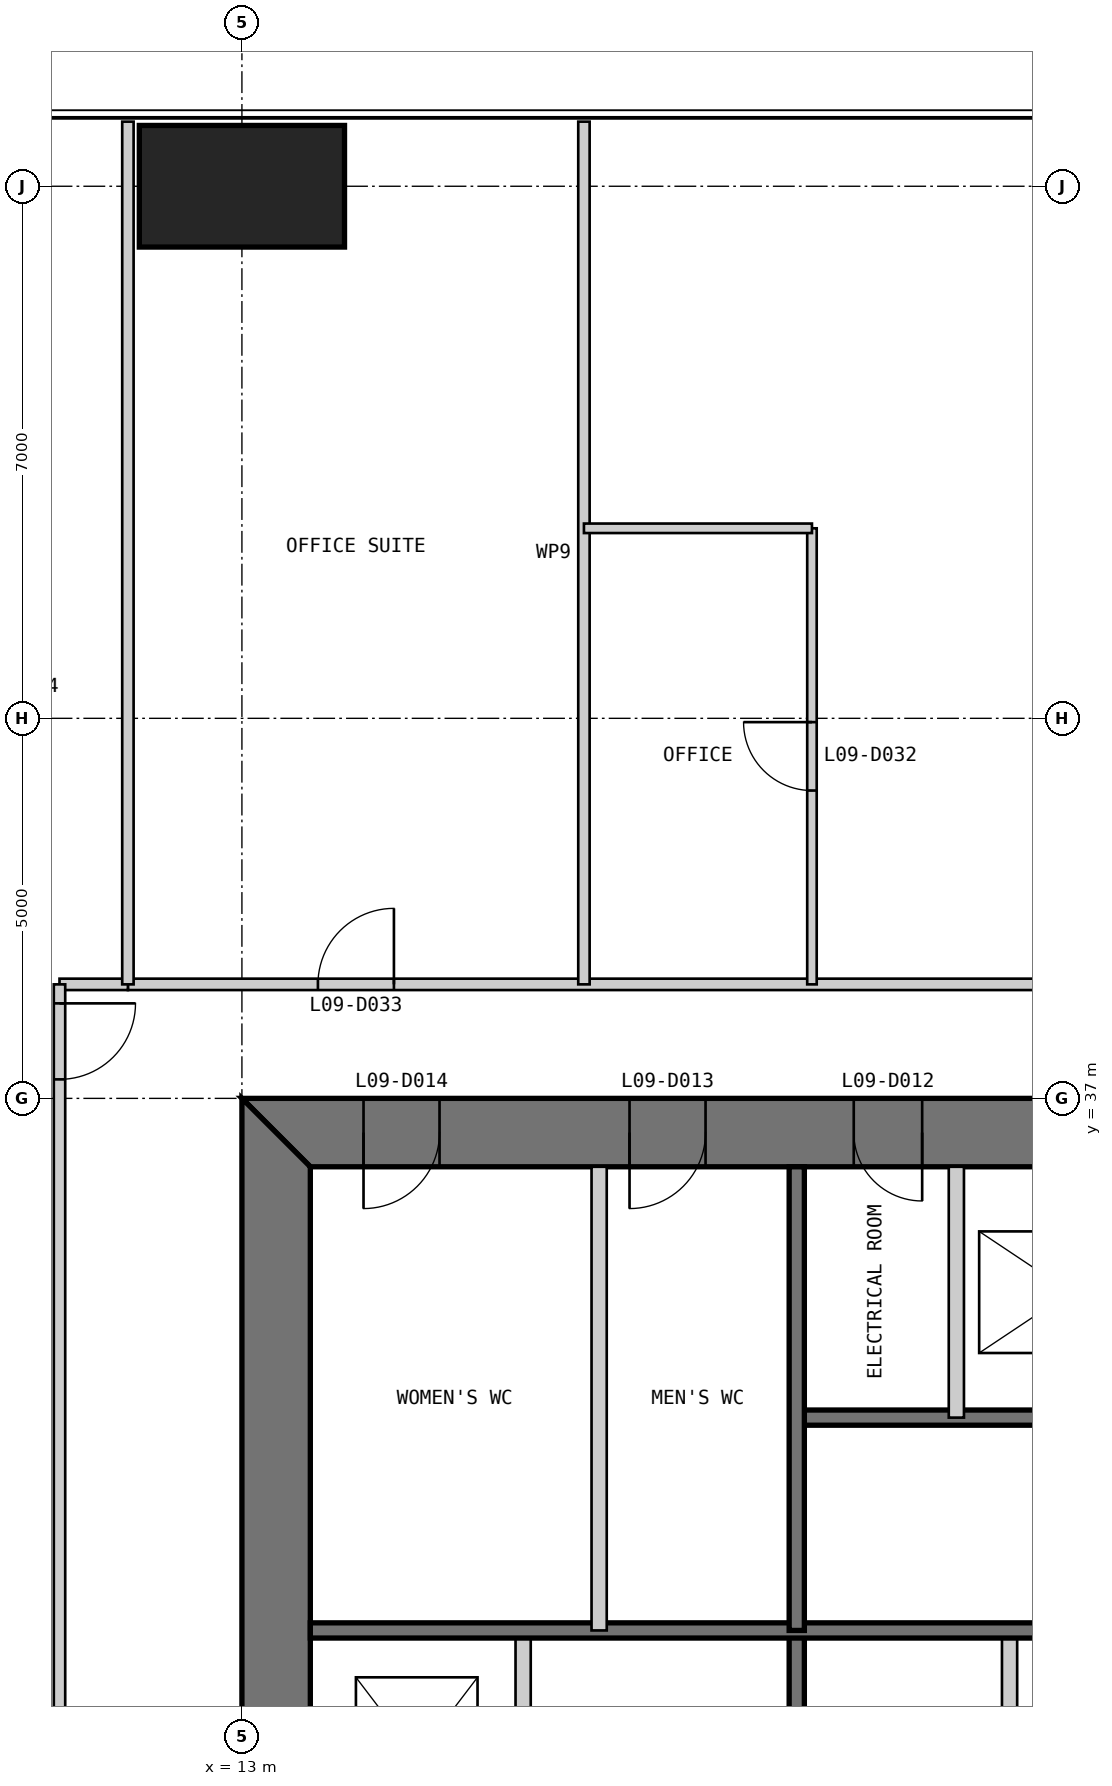
"""IFC4 building model, lengths in metres.
Left out: names, types, materials, properties, quantities, classifications, styles, units other than length and angle.
Written with IfcOpenShell. Run it as: python <this file> out.ifc"""

import sys

from ifc_helpers import new_model, si_unit, direction, frame, frame_2d, origin, origin_2d, place, context, subcontext, project, spatial, polyline, rectangle, outline, extrude, element, fill, save


model = new_model("IFC4")
c1 = context("Model", 3, precision=1e-05, world=origin(), true_north=direction((0.0, 1.0)))
c2 = subcontext(c1, "Body", "Model", "MODEL_VIEW")
j1 = project(units=[si_unit("LENGTHUNIT", "METRE"), si_unit("PLANEANGLEUNIT", "RADIAN")], contexts=[c1])
p1 = place(None, origin())
s1 = spatial("IfcSite", under=j1, at=p1, CompositionType="ELEMENT")
p2 = place(p1, origin())
s2 = spatial("IfcBuilding", under=s1, at=p2, CompositionType="ELEMENT")
p3 = place(p2, frame((0.0, 0.0, 43.0)))
s3 = spatial("IfcBuildingStorey", under=s2, at=p3, CompositionType="ELEMENT", Elevation=43.0)
p4 = place(p3, frame((13.0, 49.0, 0.0), z_axis=(0.0, 0.0, 1.0), x_axis=(1.0, 0.0, 0.0)))
e1 = element("IfcColumn", 1, at=p4, inside=s3, PredefinedType="COLUMN", context=c2, shape_type="SweptSolid", body=[
    extrude(rectangle(XDim=2.7, YDim=1.6, at=origin_2d()), origin(), (0.0, 0.0, 1.0), 4.0),
])
p5 = place(p3, frame((37.0, 36.55, 0.0), z_axis=(0.0, 0.0, 1.0), x_axis=(-1.0, 0.0, 0.0)))
e2 = element("IfcWall", 2, at=p5, inside=s3, PredefinedType="SHEAR", context=c2, shape_type="SweptSolid", body=[
    extrude(outline(polyline([(0.0, -0.45), (24.0, -0.45), (23.1, 0.45), (0.9, 0.45), (0.0, -0.45)])), origin(), (0.0, 0.0, 1.0), 4.0),
])
p6 = place(p5, frame((4.9, 0.0, 0.0)))
e3 = element("IfcOpeningElement", 3, at=p6, cuts=e2, PredefinedType="OPENING", context=c2, shape_type="SweptSolid", body=[
    extrude(rectangle(XDim=1.0, YDim=2.2, at=frame_2d((0.5, 1.1))), frame((0.0, 0.46, 0.0), z_axis=(0.0, -1.0, 0.0), x_axis=(1.0, 0.0, 0.0)), (0.0, 0.0, 1.0), 0.92),
])
p7 = place(p5, frame((8.9, 0.0, 0.0)))
e4 = element("IfcOpeningElement", 4, at=p7, cuts=e2, PredefinedType="OPENING", context=c2, shape_type="SweptSolid", body=[
    extrude(rectangle(XDim=1.1, YDim=2.2, at=frame_2d((0.55, 1.1))), frame((0.0, 0.46, 0.0), z_axis=(0.0, -1.0, 0.0), x_axis=(1.0, 0.0, 0.0)), (0.0, 0.0, 1.0), 0.92),
])
p8 = place(p5, frame((15.05, 0.0, 0.0)))
e5 = element("IfcOpeningElement", 5, at=p8, cuts=e2, PredefinedType="OPENING", context=c2, shape_type="SweptSolid", body=[
    extrude(rectangle(XDim=0.9, YDim=2.2, at=frame_2d((0.45, 1.1))), frame((0.0, 0.46, 0.0), z_axis=(0.0, -1.0, 0.0), x_axis=(1.0, 0.0, 0.0)), (0.0, 0.0, 1.0), 0.92),
])
p9 = place(p5, frame((17.9, 0.0, 0.0)))
e6 = element("IfcOpeningElement", 6, at=p9, cuts=e2, PredefinedType="OPENING", context=c2, shape_type="SweptSolid", body=[
    extrude(rectangle(XDim=1.0, YDim=2.2, at=frame_2d((0.5, 1.1))), frame((0.0, 0.46, 0.0), z_axis=(0.0, -1.0, 0.0), x_axis=(1.0, 0.0, 0.0)), (0.0, 0.0, 1.0), 0.92),
])
p10 = place(p5, frame((21.4, 0.0, 0.0)))
e7 = element("IfcOpeningElement", 7, at=p10, cuts=e2, PredefinedType="OPENING", context=c2, shape_type="SweptSolid", body=[
    extrude(rectangle(XDim=1.0, YDim=2.2, at=frame_2d((0.5, 1.1))), frame((0.0, 0.46, 0.0), z_axis=(0.0, -1.0, 0.0), x_axis=(1.0, 0.0, 0.0)), (0.0, 0.0, 1.0), 0.92),
])
p11 = place(p3, frame((13.45, 36.1, 0.0), z_axis=(0.0, 0.0, 1.0), x_axis=(0.0, -1.0, 0.0)))
e8 = element("IfcWall", 8, at=p11, inside=s3, PredefinedType="SHEAR", context=c2, shape_type="SweptSolid", body=[
    extrude(outline(polyline([(-0.9, -0.45), (23.1, -0.45), (22.2, 0.45), (0.0, 0.45), (-0.9, -0.45)])), origin(), (0.0, 0.0, 1.0), 4.0),
])
p12 = place(p11, frame((20.2, 0.0, 0.0)))
e9 = element("IfcOpeningElement", 9, at=p12, cuts=e8, PredefinedType="OPENING", context=c2, shape_type="SweptSolid", body=[
    extrude(rectangle(XDim=1.0, YDim=2.2, at=frame_2d((0.5, 1.1))), frame((0.0, 0.46, 0.0), z_axis=(0.0, -1.0, 0.0), x_axis=(1.0, 0.0, 0.0)), (0.0, 0.0, 1.0), 0.92),
])
p13 = place(p11, frame((17.25, 0.0, 0.0)))
e10 = element("IfcOpeningElement", 10, at=p13, cuts=e8, PredefinedType="OPENING", context=c2, shape_type="SweptSolid", body=[
    extrude(rectangle(XDim=0.9, YDim=2.2, at=frame_2d((0.45, 1.1))), frame((0.0, 0.46, 0.0), z_axis=(0.0, -1.0, 0.0), x_axis=(1.0, 0.0, 0.0)), (0.0, 0.0, 1.0), 0.92),
])
p14 = place(p3, frame((16.7, 13.9, 0.0), z_axis=(0.0, 0.0, 1.0), x_axis=(0.0, 1.0, 0.0)))
e11 = element("IfcWall", 11, at=p14, inside=s3, PredefinedType="PARTITIONING", context=c2, shape_type="SweptSolid", body=[
    extrude(rectangle(XDim=16.1, YDim=0.2, at=frame_2d((8.05, 0.0))), origin(), (0.0, 0.0, 1.0), 3.8),
])
p15 = place(p14, frame((7.217, 0.0, 0.0)))
e12 = element("IfcOpeningElement", 12, at=p15, cuts=e11, PredefinedType="OPENING", context=c2, shape_type="SweptSolid", body=[
    extrude(rectangle(XDim=1.1, YDim=2.2, at=frame_2d((0.55, 1.1))), frame((0.0, 0.11, 0.0), z_axis=(0.0, -1.0, 0.0), x_axis=(1.0, 0.0, 0.0)), (0.0, 0.0, 1.0), 0.22),
])
p16 = place(p14, frame((10.55, 0.0, 0.0)))
e13 = element("IfcOpeningElement", 13, at=p16, cuts=e11, PredefinedType="OPENING", context=c2, shape_type="SweptSolid", body=[
    extrude(rectangle(XDim=1.1, YDim=2.2, at=frame_2d((0.55, 1.1))), frame((0.0, 0.11, 0.0), z_axis=(0.0, -1.0, 0.0), x_axis=(1.0, 0.0, 0.0)), (0.0, 0.0, 1.0), 0.22),
])
p17 = place(p14, frame((13.883, 0.0, 0.0)))
e14 = element("IfcOpeningElement", 14, at=p17, cuts=e11, PredefinedType="OPENING", context=c2, shape_type="SweptSolid", body=[
    extrude(rectangle(XDim=1.1, YDim=2.2, at=frame_2d((0.55, 1.1))), frame((0.0, 0.11, 0.0), z_axis=(0.0, -1.0, 0.0), x_axis=(1.0, 0.0, 0.0)), (0.0, 0.0, 1.0), 0.22),
])
p18 = place(p3, frame((20.3, 13.9, 0.0), z_axis=(0.0, 0.0, 1.0), x_axis=(0.0, 1.0, 0.0)))
e15 = element("IfcWall", 15, at=p18, inside=s3, PredefinedType="SOLIDWALL", context=c2, shape_type="SweptSolid", body=[
    extrude(rectangle(XDim=16.1, YDim=0.2, at=frame_2d((8.05, 0.0))), origin(), (0.0, 0.0, 1.0), 3.8),
])
p19 = place(p3, frame((23.1, 20.0, 0.0), z_axis=(0.0, 0.0, 1.0), x_axis=(0.0, 1.0, 0.0)))
e16 = element("IfcWall", 16, at=p19, inside=s3, PredefinedType="PARTITIONING", context=c2, shape_type="SweptSolid", body=[
    extrude(rectangle(XDim=10.0, YDim=0.2, at=frame_2d((5.0, 0.0))), origin(), (0.0, 0.0, 1.0), 3.8),
])
p20 = place(p3, frame((29.7, 32.8, 0.0), z_axis=(0.0, 0.0, 1.0), x_axis=(-1.0, 0.0, 0.0)))
e17 = element("IfcWall", 17, at=p20, inside=s3, PredefinedType="SOLIDWALL", context=c2, shape_type="SweptSolid", body=[
    extrude(rectangle(XDim=9.4, YDim=0.2, at=frame_2d((4.7, 0.0))), origin(), (0.0, 0.0, 1.0), 3.8),
])
p21 = place(p20, frame((0.25, 0.0, 0.0)))
e18 = element("IfcOpeningElement", 18, at=p21, cuts=e17, PredefinedType="OPENING", context=c2, shape_type="SweptSolid", body=[
    extrude(rectangle(XDim=1.0, YDim=2.2, at=frame_2d((0.5, 1.1))), frame((0.0, 0.11, 0.0), z_axis=(0.0, -1.0, 0.0), x_axis=(1.0, 0.0, 0.0)), (0.0, 0.0, 1.0), 0.22),
])
p22 = place(p3, frame((29.7, 30.0, 0.0), z_axis=(0.0, 0.0, 1.0), x_axis=(-1.0, 0.0, 0.0)))
e19 = element("IfcWall", 19, at=p22, inside=s3, PredefinedType="SOLIDWALL", context=c2, shape_type="SweptSolid", body=[
    extrude(rectangle(XDim=15.8, YDim=0.2, at=frame_2d((7.9, 0.0))), origin(), (0.0, 0.0, 1.0), 3.8),
])
p23 = place(p3, frame((22.4, 36.1, 0.0), z_axis=(0.0, 0.0, 1.0), x_axis=(0.0, -1.0, 0.0)))
e20 = element("IfcWall", 20, at=p23, inside=s3, PredefinedType="PARTITIONING", context=c2, shape_type="SweptSolid", body=[
    extrude(rectangle(XDim=3.3, YDim=0.2, at=frame_2d((1.65, 0.0))), origin(), (0.0, 0.0, 1.0), 3.8),
])
p24 = place(p3, frame((20.3, 36.1, 0.0), z_axis=(0.0, 0.0, 1.0), x_axis=(0.0, -1.0, 0.0)))
e21 = element("IfcWall", 21, at=p24, inside=s3, PredefinedType="SOLIDWALL", context=c2, shape_type="SweptSolid", body=[
    extrude(rectangle(XDim=6.1, YDim=0.2, at=frame_2d((3.05, 0.0))), origin(), (0.0, 0.0, 1.0), 3.8),
])
p25 = place(p3, frame((17.7, 36.1, 0.0), z_axis=(0.0, 0.0, 1.0), x_axis=(0.0, -1.0, 0.0)))
e22 = element("IfcWall", 22, at=p25, inside=s3, PredefinedType="PARTITIONING", context=c2, shape_type="SweptSolid", body=[
    extrude(rectangle(XDim=6.1, YDim=0.2, at=frame_2d((3.05, 0.0))), origin(), (0.0, 0.0, 1.0), 3.8),
])
p26 = place(p3, frame((38.5, 38.5, 0.0), z_axis=(0.0, 0.0, 1.0), x_axis=(-1.0, 0.0, 0.0)))
e23 = element("IfcWall", 23, at=p26, inside=s3, PredefinedType="PARTITIONING", context=c2, shape_type="SweptSolid", body=[
    extrude(rectangle(XDim=27.0, YDim=0.15, at=frame_2d((13.5, 0.0))), origin(), (0.0, 0.0, 1.0), 3.85),
])
p27 = place(p26, frame((2.5, 0.0, 0.0)))
e24 = element("IfcOpeningElement", 24, at=p27, cuts=e23, PredefinedType="OPENING", context=c2, shape_type="SweptSolid", body=[
    extrude(rectangle(XDim=1.0, YDim=2.2, at=frame_2d((0.5, 1.1))), frame((0.0, 0.085, 0.0), z_axis=(0.0, -1.0, 0.0), x_axis=(1.0, 0.0, 0.0)), (0.0, 0.0, 1.0), 0.17),
])
p28 = place(p26, frame((13.0, 0.0, 0.0)))
e25 = element("IfcOpeningElement", 25, at=p28, cuts=e23, PredefinedType="OPENING", context=c2, shape_type="SweptSolid", body=[
    extrude(rectangle(XDim=1.0, YDim=2.2, at=frame_2d((0.5, 1.1))), frame((0.0, 0.085, 0.0), z_axis=(0.0, -1.0, 0.0), x_axis=(1.0, 0.0, 0.0)), (0.0, 0.0, 1.0), 0.17),
])
p29 = place(p26, frame((23.5, 0.0, 0.0)))
e26 = element("IfcOpeningElement", 26, at=p29, cuts=e23, PredefinedType="OPENING", context=c2, shape_type="SweptSolid", body=[
    extrude(rectangle(XDim=1.0, YDim=2.2, at=frame_2d((0.5, 1.1))), frame((0.0, 0.085, 0.0), z_axis=(0.0, -1.0, 0.0), x_axis=(1.0, 0.0, 0.0)), (0.0, 0.0, 1.0), 0.17),
])
p30 = place(p3, frame((20.5, 44.5, 0.0), z_axis=(0.0, 0.0, 1.0), x_axis=(0.0, -1.0, 0.0)))
e27 = element("IfcWall", 27, at=p30, inside=s3, PredefinedType="PARTITIONING", context=c2, shape_type="SweptSolid", body=[
    extrude(rectangle(XDim=6.0, YDim=0.125, at=frame_2d((3.0, 0.0))), origin(), (0.0, 0.0, 1.0), 3.85),
])
p31 = place(p30, frame((2.55, 0.0, 0.0)))
e28 = element("IfcOpeningElement", 28, at=p31, cuts=e27, PredefinedType="OPENING", context=c2, shape_type="SweptSolid", body=[
    extrude(rectangle(XDim=0.9, YDim=2.2, at=frame_2d((0.45, 1.1))), frame((0.0, 0.073, 0.0), z_axis=(0.0, -1.0, 0.0), x_axis=(1.0, 0.0, 0.0)), (0.0, 0.0, 1.0), 0.145),
])
p32 = place(p3, frame((17.5, 49.85, 0.0), z_axis=(0.0, 0.0, 1.0), x_axis=(0.0, -1.0, 0.0)))
e29 = element("IfcWall", 29, at=p32, inside=s3, PredefinedType="PARTITIONING", context=c2, shape_type="SweptSolid", body=[
    extrude(rectangle(XDim=11.35, YDim=0.15, at=frame_2d((5.675, 0.0))), origin(), (0.0, 0.0, 1.0), 3.85),
])
p33 = place(p3, frame((20.5, 44.5, 0.0), z_axis=(0.0, 0.0, 1.0), x_axis=(-1.0, 0.0, 0.0)))
e30 = element("IfcWall", 30, at=p33, inside=s3, PredefinedType="PARTITIONING", context=c2, shape_type="SweptSolid", body=[
    extrude(rectangle(XDim=3.0, YDim=0.125, at=frame_2d((1.5, 0.0))), origin(), (0.0, 0.0, 1.0), 3.85),
])
p34 = place(p3, frame((11.5, 38.5, 0.0), z_axis=(0.0, 0.0, 1.0), x_axis=(-1.0, 0.0, 0.0)))
e31 = element("IfcWall", 31, at=p34, inside=s3, PredefinedType="PARTITIONING", context=c2, shape_type="SweptSolid", body=[
    extrude(rectangle(XDim=0.9, YDim=0.15, at=frame_2d((0.45, 0.0))), origin(), (0.0, 0.0, 1.0), 3.85),
])
p35 = place(p3, frame((10.6, 38.5, 0.0), z_axis=(0.0, 0.0, 1.0), x_axis=(0.0, -1.0, 0.0)))
e32 = element("IfcWall", 32, at=p35, inside=s3, PredefinedType="PARTITIONING", context=c2, shape_type="SweptSolid", body=[
    extrude(rectangle(XDim=27.0, YDim=0.15, at=frame_2d((13.5, 0.0))), origin(), (0.0, 0.0, 1.0), 3.85),
])
p36 = place(p35, frame((0.25, 0.0, 0.0)))
e33 = element("IfcOpeningElement", 33, at=p36, cuts=e32, PredefinedType="OPENING", context=c2, shape_type="SweptSolid", body=[
    extrude(rectangle(XDim=1.0, YDim=2.2, at=frame_2d((0.5, 1.1))), frame((0.0, 0.085, 0.0), z_axis=(0.0, -1.0, 0.0), x_axis=(1.0, 0.0, 0.0)), (0.0, 0.0, 1.0), 0.17),
])
p37 = place(p35, frame((22.75, 0.0, 0.0)))
e34 = element("IfcOpeningElement", 34, at=p37, cuts=e32, PredefinedType="OPENING", context=c2, shape_type="SweptSolid", body=[
    extrude(rectangle(XDim=1.0, YDim=2.2, at=frame_2d((0.5, 1.1))), frame((0.0, 0.085, 0.0), z_axis=(0.0, -1.0, 0.0), x_axis=(1.0, 0.0, 0.0)), (0.0, 0.0, 1.0), 0.17),
])
p38 = place(p3, frame((11.5, 49.85, 0.0), z_axis=(0.0, 0.0, 1.0), x_axis=(0.0, -1.0, 0.0)))
e35 = element("IfcWall", 35, at=p38, inside=s3, PredefinedType="PARTITIONING", context=c2, shape_type="SweptSolid", body=[
    extrude(rectangle(XDim=11.35, YDim=0.15, at=frame_2d((5.675, 0.0))), origin(), (0.0, 0.0, 1.0), 3.85),
])
p39 = place(p8, origin())
e36 = element("IfcDoor", 36, at=p39, inside=s3, OperationType="SINGLE_SWING_LEFT", PredefinedType="DOOR", context=c2, shape_type="SweptSolid", body=[
    extrude(rectangle(XDim=0.9, YDim=2.2, at=frame_2d((0.45, 1.1))), frame((0.0, 0.025, 0.0), z_axis=(0.0, -1.0, 0.0), x_axis=(1.0, 0.0, 0.0)), (0.0, 0.0, 1.0), 0.05),
    extrude(outline(polyline([(0.0, 0.0), (0.04, 0.0), (0.04, 2.16), (0.86, 2.16), (0.86, 0.0), (0.9, 0.0), (0.9, 2.2), (0.0, 2.2), (0.0, 0.0)])), frame((0.0, 0.3, 0.0), z_axis=(0.0, -1.0, 0.0), x_axis=(1.0, 0.0, 0.0)), (0.0, 0.0, 1.0), 0.6),
])
fill(e5, e36)
p40 = place(p9, origin())
e37 = element("IfcDoor", 37, at=p40, inside=s3, OperationType="SINGLE_SWING_RIGHT", PredefinedType="DOOR", context=c2, shape_type="SweptSolid", body=[
    extrude(rectangle(XDim=1.0, YDim=2.2, at=frame_2d((0.5, 1.1))), frame((0.0, 0.025, 0.0), z_axis=(0.0, -1.0, 0.0), x_axis=(1.0, 0.0, 0.0)), (0.0, 0.0, 1.0), 0.05),
    extrude(outline(polyline([(0.0, 0.0), (0.04, 0.0), (0.04, 2.16), (0.96, 2.16), (0.96, 0.0), (1.0, 0.0), (1.0, 2.2), (0.0, 2.2), (0.0, 0.0)])), frame((0.0, 0.3, 0.0), z_axis=(0.0, -1.0, 0.0), x_axis=(1.0, 0.0, 0.0)), (0.0, 0.0, 1.0), 0.6),
])
fill(e6, e37)
p41 = place(p10, origin())
e38 = element("IfcDoor", 38, at=p41, inside=s3, OperationType="SINGLE_SWING_RIGHT", PredefinedType="DOOR", context=c2, shape_type="SweptSolid", body=[
    extrude(rectangle(XDim=1.0, YDim=2.2, at=frame_2d((0.5, 1.1))), frame((0.0, 0.025, 0.0), z_axis=(0.0, -1.0, 0.0), x_axis=(1.0, 0.0, 0.0)), (0.0, 0.0, 1.0), 0.05),
    extrude(outline(polyline([(0.0, 0.0), (0.04, 0.0), (0.04, 2.16), (0.96, 2.16), (0.96, 0.0), (1.0, 0.0), (1.0, 2.2), (0.0, 2.2), (0.0, 0.0)])), frame((0.0, 0.3, 0.0), z_axis=(0.0, -1.0, 0.0), x_axis=(1.0, 0.0, 0.0)), (0.0, 0.0, 1.0), 0.6),
])
fill(e7, e38)
p42 = place(p31, frame((0.9, 0.0, 0.0), z_axis=(0.0, 0.0, 1.0), x_axis=(-1.0, 0.0, 0.0)))
e39 = element("IfcDoor", 39, at=p42, inside=s3, OperationType="SINGLE_SWING_RIGHT", PredefinedType="DOOR", context=c2, shape_type="SweptSolid", body=[
    extrude(rectangle(XDim=0.9, YDim=2.2, at=frame_2d((0.45, 1.1))), frame((0.0, 0.025, 0.0), z_axis=(0.0, -1.0, 0.0), x_axis=(1.0, 0.0, 0.0)), (0.0, 0.0, 1.0), 0.05),
])
fill(e28, e39)
p43 = place(p29, frame((1.0, 0.0, 0.0), z_axis=(0.0, 0.0, 1.0), x_axis=(-1.0, 0.0, 0.0)))
e40 = element("IfcDoor", 40, at=p43, inside=s3, OperationType="SINGLE_SWING_RIGHT", PredefinedType="DOOR", context=c2, shape_type="SweptSolid", body=[
    extrude(rectangle(XDim=1.0, YDim=2.2, at=frame_2d((0.5, 1.1))), frame((0.0, 0.025, 0.0), z_axis=(0.0, -1.0, 0.0), x_axis=(1.0, 0.0, 0.0)), (0.0, 0.0, 1.0), 0.05),
])
fill(e26, e40)
p44 = place(p36, origin())
e41 = element("IfcDoor", 41, at=p44, inside=s3, OperationType="SINGLE_SWING_LEFT", PredefinedType="DOOR", context=c2, shape_type="SweptSolid", body=[
    extrude(rectangle(XDim=1.0, YDim=2.2, at=frame_2d((0.5, 1.1))), frame((0.0, 0.025, 0.0), z_axis=(0.0, -1.0, 0.0), x_axis=(1.0, 0.0, 0.0)), (0.0, 0.0, 1.0), 0.05),
])
fill(e33, e41)
save(model, sys.argv[1])
